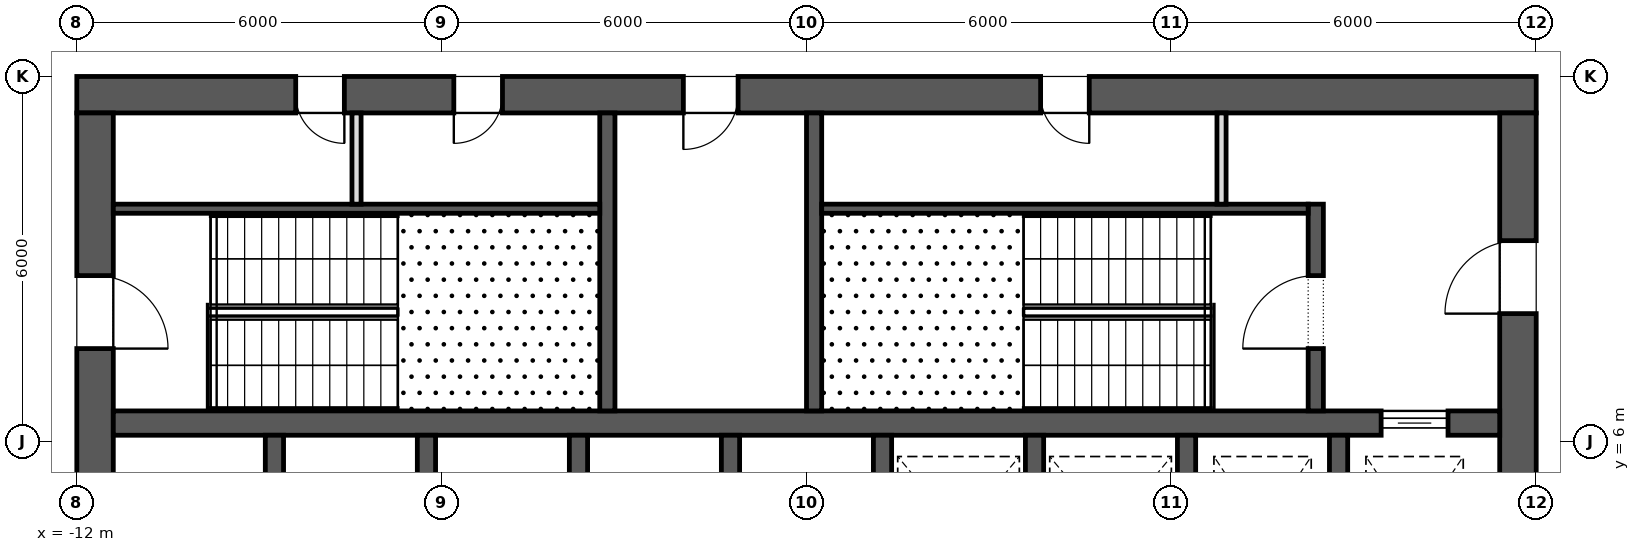
"""IFC4 building model, lengths in metres.
Left out: names, types, materials, properties, quantities, classifications, styles, units other than length and angle.
Written with IfcOpenShell. Run it as: python <this file> out.ifc"""

import sys

from ifc_helpers import new_model, si_unit, direction, frame, frame_2d, origin, place, context, subcontext, project, spatial, rectangle, extrude, element, fill, save


model = new_model("IFC4")
c1 = context("Model", 3, precision=1e-05, world=origin(), true_north=direction((0.0, 1.0)))
c2 = subcontext(c1, "Body", "Model", "MODEL_VIEW")
j1 = project(units=[si_unit("LENGTHUNIT", "METRE"), si_unit("PLANEANGLEUNIT", "RADIAN")], contexts=[c1])
p1 = place(None, origin())
s1 = spatial("IfcSite", under=j1, at=p1, CompositionType="ELEMENT")
p2 = place(p1, origin())
s2 = spatial("IfcBuilding", under=s1, at=p2, CompositionType="ELEMENT")
p3 = place(p2, frame((0.0, 0.0, 112.9)))
s3 = spatial("IfcBuildingStorey", under=s2, at=p3, CompositionType="ELEMENT", Elevation=112.9)
p4 = place(p3, frame((-12.0, 11.7, 0.0), z_axis=(0.0, 0.0, 1.0), x_axis=(1.0, 0.0, 0.0)))
e1 = element("IfcWall", 1, at=p4, inside=s3, PredefinedType="SHEAR", context=c2, shape_type="SweptSolid", body=[
    extrude(rectangle(XDim=24.0, YDim=0.6, at=frame_2d((12.0, 0.0))), origin(), (0.0, 0.0, 1.0), 4.2),
])
p5 = place(p4, frame((9.975, 0.0, 0.0)))
e2 = element("IfcOpeningElement", 2, at=p5, cuts=e1, PredefinedType="OPENING", context=c2, shape_type="SweptSolid", body=[
    extrude(rectangle(XDim=0.9, YDim=2.1, at=frame_2d((0.45, 1.05))), frame((0.0, 0.312, 0.0), z_axis=(0.0, -1.0, 0.0), x_axis=(1.0, 0.0, 0.0)), (0.0, 0.0, 1.0), 0.624),
])
p6 = place(p4, frame((3.6, 0.0, 0.0)))
e3 = element("IfcOpeningElement", 3, at=p6, cuts=e1, PredefinedType="OPENING", context=c2, shape_type="SweptSolid", body=[
    extrude(rectangle(XDim=0.8, YDim=2.1, at=frame_2d((0.4, 1.05))), frame((0.0, 0.312, 0.0), z_axis=(0.0, -1.0, 0.0), x_axis=(1.0, 0.0, 0.0)), (0.0, 0.0, 1.0), 0.624),
])
p7 = place(p4, frame((6.2, 0.0, 0.0)))
e4 = element("IfcOpeningElement", 4, at=p7, cuts=e1, PredefinedType="OPENING", context=c2, shape_type="SweptSolid", body=[
    extrude(rectangle(XDim=0.8, YDim=2.1, at=frame_2d((0.4, 1.05))), frame((0.0, 0.312, 0.0), z_axis=(0.0, -1.0, 0.0), x_axis=(1.0, 0.0, 0.0)), (0.0, 0.0, 1.0), 0.624),
])
p8 = place(p4, frame((15.85, 0.0, 0.0)))
e5 = element("IfcOpeningElement", 5, at=p8, cuts=e1, PredefinedType="OPENING", context=c2, shape_type="SweptSolid", body=[
    extrude(rectangle(XDim=0.8, YDim=2.1, at=frame_2d((0.4, 1.05))), frame((0.0, 0.312, 0.0), z_axis=(0.0, -1.0, 0.0), x_axis=(1.0, 0.0, 0.0)), (0.0, 0.0, 1.0), 0.624),
])
p9 = place(p3, frame((11.7, -11.4, 0.0), z_axis=(0.0, 0.0, 1.0), x_axis=(0.0, 1.0, 0.0)))
e6 = element("IfcWall", 6, at=p9, inside=s3, PredefinedType="SHEAR", context=c2, shape_type="SweptSolid", body=[
    extrude(rectangle(XDim=22.8, YDim=0.6, at=frame_2d((11.4, 0.0))), origin(), (0.0, 0.0, 1.0), 4.2),
])
p10 = place(p9, frame((10.2, 0.0, 0.0)))
e7 = element("IfcOpeningElement", 7, at=p10, cuts=e6, PredefinedType="OPENING", context=c2, shape_type="SweptSolid", body=[
    extrude(rectangle(XDim=2.4, YDim=2.1, at=frame_2d((1.2, 1.05))), frame((0.0, 0.312, 0.0), z_axis=(0.0, -1.0, 0.0), x_axis=(1.0, 0.0, 0.0)), (0.0, 0.0, 1.0), 0.624),
])
p11 = place(p9, frame((19.5, 0.0, 0.0)))
e8 = element("IfcOpeningElement", 8, at=p11, cuts=e6, PredefinedType="OPENING", context=c2, shape_type="SweptSolid", body=[
    extrude(rectangle(XDim=1.2, YDim=2.1, at=frame_2d((0.6, 1.05))), frame((0.0, 0.312, 0.0), z_axis=(0.0, -1.0, 0.0), x_axis=(1.0, 0.0, 0.0)), (0.0, 0.0, 1.0), 0.624),
])
p12 = place(p9, frame((2.1, 0.0, 0.0)))
e9 = element("IfcOpeningElement", 9, at=p12, cuts=e6, PredefinedType="OPENING", context=c2, shape_type="SweptSolid", body=[
    extrude(rectangle(XDim=1.2, YDim=2.1, at=frame_2d((0.6, 1.05))), frame((0.0, 0.312, 0.0), z_axis=(0.0, -1.0, 0.0), x_axis=(1.0, 0.0, 0.0)), (0.0, 0.0, 1.0), 0.624),
])
p13 = place(p3, frame((-11.7, -11.4, 0.0), z_axis=(0.0, 0.0, 1.0), x_axis=(0.0, 1.0, 0.0)))
e10 = element("IfcWall", 10, at=p13, inside=s3, PredefinedType="SHEAR", context=c2, shape_type="SweptSolid", body=[
    extrude(rectangle(XDim=22.8, YDim=0.6, at=frame_2d((11.4, 0.0))), origin(), (0.0, 0.0, 1.0), 4.2),
])
p14 = place(p13, frame((10.2, 0.0, 0.0)))
e11 = element("IfcOpeningElement", 11, at=p14, cuts=e10, PredefinedType="OPENING", context=c2, shape_type="SweptSolid", body=[
    extrude(rectangle(XDim=2.4, YDim=2.1, at=frame_2d((1.2, 1.05))), frame((0.0, 0.312, 0.0), z_axis=(0.0, -1.0, 0.0), x_axis=(1.0, 0.0, 0.0)), (0.0, 0.0, 1.0), 0.624),
])
p15 = place(p13, frame((18.925, 0.0, 0.0)))
e12 = element("IfcOpeningElement", 12, at=p15, cuts=e10, PredefinedType="OPENING", context=c2, shape_type="SweptSolid", body=[
    extrude(rectangle(XDim=1.2, YDim=2.1, at=frame_2d((0.6, 1.05))), frame((0.0, 0.312, 0.0), z_axis=(0.0, -1.0, 0.0), x_axis=(1.0, 0.0, 0.0)), (0.0, 0.0, 1.0), 0.624),
])
p16 = place(p13, frame((2.675, 0.0, 0.0)))
e13 = element("IfcOpeningElement", 13, at=p16, cuts=e10, PredefinedType="OPENING", context=c2, shape_type="SweptSolid", body=[
    extrude(rectangle(XDim=1.2, YDim=2.1, at=frame_2d((0.6, 1.05))), frame((0.0, 0.312, 0.0), z_axis=(0.0, -1.0, 0.0), x_axis=(1.0, 0.0, 0.0)), (0.0, 0.0, 1.0), 0.624),
])
p17 = place(p3, frame((-11.4, 6.3, 0.0), z_axis=(0.0, 0.0, 1.0), x_axis=(1.0, 0.0, 0.0)))
e14 = element("IfcWall", 14, at=p17, inside=s3, PredefinedType="SHEAR", context=c2, shape_type="SweptSolid", body=[
    extrude(rectangle(XDim=22.8, YDim=0.4, at=frame_2d((11.4, 0.0))), origin(), (0.0, 0.0, 1.0), 4.2),
])
p18 = place(p17, frame((20.85, 0.0, 0.0)))
e15 = element("IfcOpeningElement", 15, at=p18, cuts=e14, PredefinedType="OPENING", context=c2, shape_type="SweptSolid", body=[
    extrude(rectangle(XDim=1.1, YDim=2.1, at=frame_2d((0.55, 1.05))), frame((0.0, 0.212, 0.0), z_axis=(0.0, -1.0, 0.0), x_axis=(1.0, 0.0, 0.0)), (0.0, 0.0, 1.0), 0.424),
])
for number, where, z_axis, x_axis in (
    (16, (-8.75, 3.2, 0.0), (0.0, 0.0, 1.0), (0.0, 1.0, 0.0)),
    (17, (-6.25, 3.2, 0.0), (0.0, 0.0, 1.0), (0.0, 1.0, 0.0)),
    (18, (-3.75, 3.2, 0.0), (0.0, 0.0, 1.0), (0.0, 1.0, 0.0)),
    (19, (-1.25, 3.2, 0.0), (0.0, 0.0, 1.0), (0.0, 1.0, 0.0)),
    (20, (1.25, 3.2, 0.0), (0.0, 0.0, 1.0), (0.0, 1.0, 0.0)),
    (21, (3.75, 3.2, 0.0), (0.0, 0.0, 1.0), (0.0, 1.0, 0.0)),
    (22, (6.25, 3.2, 0.0), (0.0, 0.0, 1.0), (0.0, 1.0, 0.0)),
    (23, (8.75, 3.2, 0.0), (0.0, 0.0, 1.0), (0.0, 1.0, 0.0)),
):
    element("IfcWall", number, at=place(p3, frame(where, z_axis=z_axis, x_axis=x_axis)), inside=s3, PredefinedType="SHEAR", context=c2, shape_type="SweptSolid", body=[
        extrude(rectangle(XDim=2.9, YDim=0.3, at=frame_2d((1.45, 0.0))), origin(), (0.0, 0.0, 1.0), 4.2),
    ])
for number, where, z_axis, x_axis in (
    (24, (-3.275, 6.5, 0.0), (0.0, 0.0, 1.0), (0.0, 1.0, 0.0)),
    (25, (0.125, 6.5, 0.0), (0.0, 0.0, 1.0), (0.0, 1.0, 0.0)),
):
    element("IfcWall", number, at=place(p3, frame(where, z_axis=z_axis, x_axis=x_axis)), inside=s3, PredefinedType="SHEAR", context=c2, shape_type="SweptSolid", body=[
        extrude(rectangle(XDim=4.9, YDim=0.25, at=frame_2d((2.45, 0.0))), origin(), (0.0, 0.0, 1.0), 3.9),
    ])
p19 = place(p3, frame((8.375, 6.5, 0.0), z_axis=(0.0, 0.0, 1.0), x_axis=(0.0, 1.0, 0.0)))
e26 = element("IfcWall", 26, at=p19, inside=s3, PredefinedType="SHEAR", context=c2, shape_type="SweptSolid", body=[
    extrude(rectangle(XDim=3.4, YDim=0.25, at=frame_2d((1.7, 0.0))), origin(), (0.0, 0.0, 1.0), 3.9),
])
p20 = place(p19, frame((1.025, 0.0, 0.0)))
e27 = element("IfcOpeningElement", 27, at=p20, cuts=e26, PredefinedType="OPENING", context=c2, shape_type="SweptSolid", body=[
    extrude(rectangle(XDim=1.2, YDim=2.1, at=frame_2d((0.6, 1.05))), frame((0.0, 0.137, 0.0), z_axis=(0.0, -1.0, 0.0), x_axis=(1.0, 0.0, 0.0)), (0.0, 0.0, 1.0), 0.274),
])
for number, where, z_axis, x_axis in (
    (28, (-11.4, 9.825, 0.0), (0.0, 0.0, 1.0), (1.0, 0.0, 0.0)),
    (29, (0.25, 9.825, 0.0), (0.0, 0.0, 1.0), (1.0, 0.0, 0.0)),
):
    element("IfcWall", number, at=place(p3, frame(where, z_axis=z_axis, x_axis=x_axis)), inside=s3, PredefinedType="SHEAR", context=c2, shape_type="SweptSolid", body=[
        extrude(rectangle(XDim=8.0, YDim=0.15, at=frame_2d((4.0, 0.0))), origin(), (0.0, 0.0, 1.0), 3.9),
    ])
for number, where, z_axis, x_axis in (
    (30, (-7.4, 9.9, 0.0), (0.0, 0.0, 1.0), (0.0, 1.0, 0.0)),
    (31, (6.825, 9.9, 0.0), (0.0, 0.0, 1.0), (0.0, 1.0, 0.0)),
):
    element("IfcWall", number, at=place(p3, frame(where, z_axis=z_axis, x_axis=x_axis)), inside=s3, PredefinedType="PARTITIONING", context=c2, shape_type="SweptSolid", body=[
        extrude(rectangle(XDim=1.5, YDim=0.15, at=frame_2d((0.75, 0.0))), origin(), (0.0, 0.0, 1.0), 3.9),
    ])
p21 = place(p18, origin())
e32 = element("IfcDoor", 32, at=p21, inside=s3, OperationType="SLIDING_TO_LEFT", PredefinedType="DOOR", context=c2, shape_type="SweptSolid", body=[
    extrude(rectangle(XDim=1.1, YDim=2.1, at=frame_2d((0.55, 1.05))), frame((0.0, 0.025, 0.0), z_axis=(0.0, -1.0, 0.0), x_axis=(1.0, 0.0, 0.0)), (0.0, 0.0, 1.0), 0.05),
])
fill(e15, e32)
p22 = place(p15, frame((1.2, 0.0, 0.0), z_axis=(0.0, 0.0, 1.0), x_axis=(-1.0, 0.0, 0.0)))
e33 = element("IfcDoor", 33, at=p22, inside=s3, OperationType="SINGLE_SWING_LEFT", PredefinedType="DOOR", context=c2, shape_type="SweptSolid", body=[
    extrude(rectangle(XDim=1.2, YDim=2.1, at=frame_2d((0.6, 1.05))), frame((0.0, 0.025, 0.0), z_axis=(0.0, -1.0, 0.0), x_axis=(1.0, 0.0, 0.0)), (0.0, 0.0, 1.0), 0.05),
])
fill(e12, e33)
p23 = place(p20, origin())
e34 = element("IfcDoor", 34, at=p23, inside=s3, OperationType="SINGLE_SWING_RIGHT", PredefinedType="DOOR", context=c2, shape_type="SweptSolid", body=[
    extrude(rectangle(XDim=1.2, YDim=2.1, at=frame_2d((0.6, 1.05))), frame((0.0, 0.025, 0.0), z_axis=(0.0, -1.0, 0.0), x_axis=(1.0, 0.0, 0.0)), (0.0, 0.0, 1.0), 0.05),
])
fill(e27, e34)
p24 = place(p11, origin())
e35 = element("IfcDoor", 35, at=p24, inside=s3, OperationType="SINGLE_SWING_RIGHT", PredefinedType="DOOR", context=c2, shape_type="SweptSolid", body=[
    extrude(rectangle(XDim=1.2, YDim=2.1, at=frame_2d((0.6, 1.05))), frame((0.0, 0.025, 0.0), z_axis=(0.0, -1.0, 0.0), x_axis=(1.0, 0.0, 0.0)), (0.0, 0.0, 1.0), 0.05),
])
fill(e8, e35)
p25 = place(p5, frame((0.9, 0.0, 0.0), z_axis=(0.0, 0.0, 1.0), x_axis=(-1.0, 0.0, 0.0)))
e36 = element("IfcDoor", 36, at=p25, inside=s3, OperationType="SINGLE_SWING_LEFT", PredefinedType="DOOR", context=c2, shape_type="SweptSolid", body=[
    extrude(rectangle(XDim=0.9, YDim=2.1, at=frame_2d((0.45, 1.05))), frame((0.0, 0.025, 0.0), z_axis=(0.0, -1.0, 0.0), x_axis=(1.0, 0.0, 0.0)), (0.0, 0.0, 1.0), 0.05),
])
fill(e2, e36)
p26 = place(p6, frame((0.8, 0.0, 0.0), z_axis=(0.0, 0.0, 1.0), x_axis=(-1.0, 0.0, 0.0)))
e37 = element("IfcDoor", 37, at=p26, inside=s3, OperationType="SINGLE_SWING_RIGHT", PredefinedType="DOOR", context=c2, shape_type="SweptSolid", body=[
    extrude(rectangle(XDim=0.8, YDim=2.1, at=frame_2d((0.4, 1.05))), frame((0.0, 0.025, 0.0), z_axis=(0.0, -1.0, 0.0), x_axis=(1.0, 0.0, 0.0)), (0.0, 0.0, 1.0), 0.05),
])
fill(e3, e37)
p27 = place(p7, frame((0.8, 0.0, 0.0), z_axis=(0.0, 0.0, 1.0), x_axis=(-1.0, 0.0, 0.0)))
e38 = element("IfcDoor", 38, at=p27, inside=s3, OperationType="SINGLE_SWING_LEFT", PredefinedType="DOOR", context=c2, shape_type="SweptSolid", body=[
    extrude(rectangle(XDim=0.8, YDim=2.1, at=frame_2d((0.4, 1.05))), frame((0.0, 0.025, 0.0), z_axis=(0.0, -1.0, 0.0), x_axis=(1.0, 0.0, 0.0)), (0.0, 0.0, 1.0), 0.05),
])
fill(e4, e38)
p28 = place(p8, frame((0.8, 0.0, 0.0), z_axis=(0.0, 0.0, 1.0), x_axis=(-1.0, 0.0, 0.0)))
e39 = element("IfcDoor", 39, at=p28, inside=s3, OperationType="SINGLE_SWING_RIGHT", PredefinedType="DOOR", context=c2, shape_type="SweptSolid", body=[
    extrude(rectangle(XDim=0.8, YDim=2.1, at=frame_2d((0.4, 1.05))), frame((0.0, 0.025, 0.0), z_axis=(0.0, -1.0, 0.0), x_axis=(1.0, 0.0, 0.0)), (0.0, 0.0, 1.0), 0.05),
])
fill(e5, e39)
save(model, sys.argv[1])
